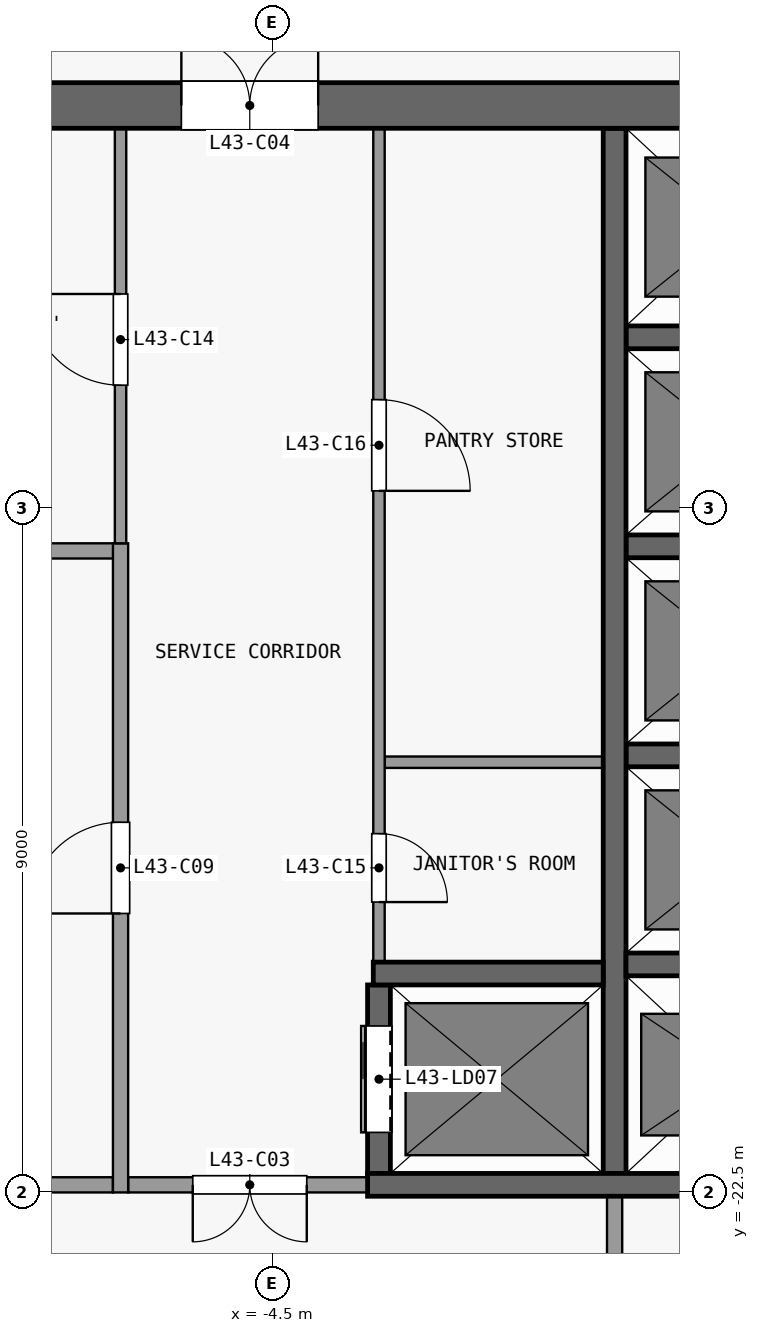
"""IFC4 building model, lengths in metres.
Left out: names, types, materials, properties, quantities, classifications, styles, units other than length and angle.
Written with IfcOpenShell. Run it as: python <this file> out.ifc"""

import sys

from ifc_helpers import new_model, si_unit, direction, frame, frame_2d, origin, place, context, subcontext, project, spatial, rectangle, extrude, element, fill, save


model = new_model("IFC4")
c1 = context("Model", 3, precision=1e-05, world=origin(), true_north=direction((0.0, 1.0)))
c2 = subcontext(c1, "Body", "Model", "MODEL_VIEW")
j1 = project(units=[si_unit("LENGTHUNIT", "METRE"), si_unit("PLANEANGLEUNIT", "RADIAN")], contexts=[c1])
p1 = place(None, origin())
s1 = spatial("IfcSite", under=j1, at=p1, CompositionType="ELEMENT")
p2 = place(p1, origin())
s2 = spatial("IfcBuilding", under=s1, at=p2, CompositionType="ELEMENT")
p3 = place(p2, frame((0.0, 0.0, 174.5)))
s3 = spatial("IfcBuildingStorey", under=s2, at=p3, CompositionType="ELEMENT", Elevation=174.5)
p4 = place(p3, frame((-13.3, -8.2, 0.0), z_axis=(0.0, 0.0, 1.0), x_axis=(1.0, 0.0, 0.0)))
e1 = element("IfcWall", 1, at=p4, inside=s3, PredefinedType="SHEAR", context=c2, shape_type="SweptSolid", body=[
    extrude(rectangle(XDim=26.6, YDim=0.6, at=frame_2d((13.3, 0.0))), origin(), (0.0, 0.0, 1.0), 3.3),
])
p5 = place(p4, frame((7.6, 0.0, 0.0)))
e2 = element("IfcOpeningElement", 2, at=p5, cuts=e1, PredefinedType="OPENING", context=c2, shape_type="SweptSolid", body=[
    extrude(rectangle(XDim=1.8, YDim=2.1, at=frame_2d((0.9, 1.05))), frame((0.0, 0.31, 0.0), z_axis=(0.0, -1.0, 0.0), x_axis=(1.0, 0.0, 0.0)), (0.0, 0.0, 1.0), 0.62),
])
p6 = place(p4, frame((17.2, 0.0, 0.0)))
e3 = element("IfcOpeningElement", 3, at=p6, cuts=e1, PredefinedType="OPENING", context=c2, shape_type="SweptSolid", body=[
    extrude(rectangle(XDim=1.8, YDim=2.1, at=frame_2d((0.9, 1.05))), frame((0.0, 0.31, 0.0), z_axis=(0.0, -1.0, 0.0), x_axis=(1.0, 0.0, 0.0)), (0.0, 0.0, 1.0), 0.62),
])
p7 = place(p4, frame((2.525, 0.0, 0.0)))
e4 = element("IfcOpeningElement", 4, at=p7, cuts=e1, PredefinedType="OPENING", context=c2, shape_type="SweptSolid", body=[
    extrude(rectangle(XDim=0.9, YDim=2.1, at=frame_2d((0.45, 1.05))), frame((0.0, 0.31, 0.0), z_axis=(0.0, -1.0, 0.0), x_axis=(1.0, 0.0, 0.0)), (0.0, 0.0, 1.0), 0.62),
])
p8 = place(p4, frame((23.175, 0.0, 0.0)))
e5 = element("IfcOpeningElement", 5, at=p8, cuts=e1, PredefinedType="OPENING", context=c2, shape_type="SweptSolid", body=[
    extrude(rectangle(XDim=0.9, YDim=2.1, at=frame_2d((0.45, 1.05))), frame((0.0, 0.31, 0.0), z_axis=(0.0, -1.0, 0.0), x_axis=(1.0, 0.0, 0.0)), (0.0, 0.0, 1.0), 0.62),
])
p9 = place(p3, frame((-9.45, -22.4, 0.0), z_axis=(0.0, 0.0, 1.0), x_axis=(1.0, 0.0, 0.0)))
e6 = element("IfcWall", 6, at=p9, inside=s3, PredefinedType="PARTITIONING", context=c2, shape_type="SweptSolid", body=[
    extrude(rectangle(XDim=2.85, YDim=0.2, at=frame_2d((1.425, 0.0))), origin(), (0.0, 0.0, 1.0), 3.3),
])
p10 = place(p3, frame((-3.25, -22.4, 0.0), z_axis=(0.0, 0.0, 1.0), x_axis=(-1.0, 0.0, 0.0)))
e7 = element("IfcWall", 7, at=p10, inside=s3, PredefinedType="PARTITIONING", context=c2, shape_type="SweptSolid", body=[
    extrude(rectangle(XDim=3.15, YDim=0.2, at=frame_2d((1.575, 0.0))), origin(), (0.0, 0.0, 1.0), 3.3),
])
p11 = place(p10, frame((0.8, 0.0, 0.0)))
e8 = element("IfcOpeningElement", 8, at=p11, cuts=e7, PredefinedType="OPENING", context=c2, shape_type="SweptSolid", body=[
    extrude(rectangle(XDim=1.5, YDim=2.1, at=frame_2d((0.75, 1.05))), frame((0.0, 0.11, 0.0), z_axis=(0.0, -1.0, 0.0), x_axis=(1.0, 0.0, 0.0)), (0.0, 0.0, 1.0), 0.22),
])
p12 = place(p3, frame((-3.25, -22.4, 0.0), z_axis=(0.0, 0.0, 1.0), x_axis=(1.0, 0.0, 0.0)))
e9 = element("IfcWall", 9, at=p12, inside=s3, PredefinedType="SHEAR", context=c2, shape_type="SweptSolid", body=[
    extrude(rectangle(XDim=6.2, YDim=0.3, at=frame_2d((3.1, 0.0))), origin(), (0.0, 0.0, 1.0), 3.3),
])
p13 = place(p3, frame((-3.175, -19.62, 0.0), z_axis=(0.0, 0.0, 1.0), x_axis=(1.0, 0.0, 0.0)))
e10 = element("IfcWall", 10, at=p13, inside=s3, PredefinedType="SHEAR", context=c2, shape_type="SweptSolid", body=[
    extrude(rectangle(XDim=3.025, YDim=0.3, at=frame_2d((1.513, 0.0))), origin(), (0.0, 0.0, 1.0), 3.3),
])
p14 = place(p3, frame((0.15, -19.5, 0.0), z_axis=(0.0, 0.0, 1.0), x_axis=(1.0, 0.0, 0.0)))
e11 = element("IfcWall", 11, at=p14, inside=s3, PredefinedType="SHEAR", context=c2, shape_type="SweptSolid", body=[
    extrude(rectangle(XDim=2.8, YDim=0.3, at=frame_2d((1.4, 0.0))), origin(), (0.0, 0.0, 1.0), 3.3),
])
p15 = place(p3, frame((-3.025, -16.84, 0.0), z_axis=(0.0, 0.0, 1.0), x_axis=(1.0, 0.0, 0.0)))
e12 = element("IfcWall", 12, at=p15, inside=s3, PredefinedType="PARTITIONING", context=c2, shape_type="SweptSolid", body=[
    extrude(rectangle(XDim=2.875, YDim=0.15, at=frame_2d((1.438, 0.0))), origin(), (0.0, 0.0, 1.0), 3.3),
])
p16 = place(p3, frame((0.15, -16.75, 0.0), z_axis=(0.0, 0.0, 1.0), x_axis=(1.0, 0.0, 0.0)))
e13 = element("IfcWall", 13, at=p16, inside=s3, PredefinedType="SHEAR", context=c2, shape_type="SweptSolid", body=[
    extrude(rectangle(XDim=2.8, YDim=0.3, at=frame_2d((1.4, 0.0))), origin(), (0.0, 0.0, 1.0), 3.3),
])
p17 = place(p3, frame((-9.5, -14.06, 0.0), z_axis=(0.0, 0.0, 1.0), x_axis=(1.0, 0.0, 0.0)))
e14 = element("IfcWall", 14, at=p17, inside=s3, PredefinedType="PARTITIONING", context=c2, shape_type="SweptSolid", body=[
    extrude(rectangle(XDim=3.075, YDim=0.2, at=frame_2d((1.538, 0.0))), origin(), (0.0, 0.0, 1.0), 3.3),
])
for number, where, z_axis, x_axis in (
    (15, (0.15, -14.0, 0.0), (0.0, 0.0, 1.0), (1.0, 0.0, 0.0)),
    (16, (0.15, -11.25, 0.0), (0.0, 0.0, 1.0), (1.0, 0.0, 0.0)),
):
    element("IfcWall", number, at=place(p3, frame(where, z_axis=z_axis, x_axis=x_axis)), inside=s3, PredefinedType="SHEAR", context=c2, shape_type="SweptSolid", body=[
        extrude(rectangle(XDim=2.8, YDim=0.3, at=frame_2d((1.4, 0.0))), origin(), (0.0, 0.0, 1.0), 3.3),
    ])
p18 = place(p3, frame((-6.5, -22.5, 0.0), z_axis=(0.0, 0.0, 1.0), x_axis=(0.0, 1.0, 0.0)))
e17 = element("IfcWall", 17, at=p18, inside=s3, PredefinedType="PARTITIONING", context=c2, shape_type="SweptSolid", body=[
    extrude(rectangle(XDim=8.54, YDim=0.2, at=frame_2d((4.27, 0.0))), origin(), (0.0, 0.0, 1.0), 3.3),
])
p19 = place(p18, frame((3.67, 0.0, 0.0)))
e18 = element("IfcOpeningElement", 18, at=p19, cuts=e17, PredefinedType="OPENING", context=c2, shape_type="SweptSolid", body=[
    extrude(rectangle(XDim=1.2, YDim=2.1, at=frame_2d((0.6, 1.05))), frame((0.0, 0.11, 0.0), z_axis=(0.0, -1.0, 0.0), x_axis=(1.0, 0.0, 0.0)), (0.0, 0.0, 1.0), 0.22),
])
p20 = place(p3, frame((-6.5, -13.96, 0.0), z_axis=(0.0, 0.0, 1.0), x_axis=(0.0, 1.0, 0.0)))
e19 = element("IfcWall", 19, at=p20, inside=s3, PredefinedType="PARTITIONING", context=c2, shape_type="SweptSolid", body=[
    extrude(rectangle(XDim=5.46, YDim=0.15, at=frame_2d((2.73, 0.0))), origin(), (0.0, 0.0, 1.0), 3.3),
])
p21 = place(p20, frame((2.08, 0.0, 0.0)))
e20 = element("IfcOpeningElement", 20, at=p21, cuts=e19, PredefinedType="OPENING", context=c2, shape_type="SweptSolid", body=[
    extrude(rectangle(XDim=1.2, YDim=2.1, at=frame_2d((0.6, 1.05))), frame((0.0, 0.085, 0.0), z_axis=(0.0, -1.0, 0.0), x_axis=(1.0, 0.0, 0.0)), (0.0, 0.0, 1.0), 0.17),
])
p22 = place(p3, frame((-3.1, -22.25, 0.0), z_axis=(0.0, 0.0, 1.0), x_axis=(0.0, 1.0, 0.0)))
e21 = element("IfcWall", 21, at=p22, inside=s3, PredefinedType="SHEAR", context=c2, shape_type="SweptSolid", body=[
    extrude(rectangle(XDim=2.48, YDim=0.3, at=frame_2d((1.24, 0.0))), origin(), (0.0, 0.0, 1.0), 3.3),
])
p23 = place(p22, frame((0.54, 0.0, 0.0)))
e22 = element("IfcOpeningElement", 22, at=p23, cuts=e21, PredefinedType="OPENING", context=c2, shape_type="SweptSolid", body=[
    extrude(rectangle(XDim=1.4, YDim=2.1, at=frame_2d((0.7, 1.05))), frame((0.0, 0.16, 0.0), z_axis=(0.0, -1.0, 0.0), x_axis=(1.0, 0.0, 0.0)), (0.0, 0.0, 1.0), 0.32),
])
p24 = place(p3, frame((-3.1, -8.5, 0.0), z_axis=(0.0, 0.0, 1.0), x_axis=(0.0, -1.0, 0.0)))
e23 = element("IfcWall", 23, at=p24, inside=s3, PredefinedType="PARTITIONING", context=c2, shape_type="SweptSolid", body=[
    extrude(rectangle(XDim=10.97, YDim=0.15, at=frame_2d((5.485, 0.0))), origin(), (0.0, 0.0, 1.0), 3.3),
])
p25 = place(p24, frame((9.28, 0.0, 0.0)))
e24 = element("IfcOpeningElement", 24, at=p25, cuts=e23, PredefinedType="OPENING", context=c2, shape_type="SweptSolid", body=[
    extrude(rectangle(XDim=0.9, YDim=2.1, at=frame_2d((0.45, 1.05))), frame((0.0, 0.085, 0.0), z_axis=(0.0, -1.0, 0.0), x_axis=(1.0, 0.0, 0.0)), (0.0, 0.0, 1.0), 0.17),
])
p26 = place(p24, frame((3.57, 0.0, 0.0)))
e25 = element("IfcOpeningElement", 25, at=p26, cuts=e23, PredefinedType="OPENING", context=c2, shape_type="SweptSolid", body=[
    extrude(rectangle(XDim=1.2, YDim=2.1, at=frame_2d((0.6, 1.05))), frame((0.0, 0.085, 0.0), z_axis=(0.0, -1.0, 0.0), x_axis=(1.0, 0.0, 0.0)), (0.0, 0.0, 1.0), 0.17),
])
p27 = place(p3, frame((0.0, -24.6, 0.0), z_axis=(0.0, 0.0, 1.0), x_axis=(0.0, 1.0, 0.0)))
e26 = element("IfcWall", 26, at=p27, inside=s3, PredefinedType="PARTITIONING", context=c2, shape_type="SweptSolid", body=[
    extrude(rectangle(XDim=2.05, YDim=0.2, at=frame_2d((1.025, 0.0))), origin(), (0.0, 0.0, 1.0), 3.3),
])
p28 = place(p3, frame((0.0, -22.25, 0.0), z_axis=(0.0, 0.0, 1.0), x_axis=(0.0, 1.0, 0.0)))
e27 = element("IfcWall", 27, at=p28, inside=s3, PredefinedType="SHEAR", context=c2, shape_type="SweptSolid", body=[
    extrude(rectangle(XDim=13.75, YDim=0.3, at=frame_2d((6.875, 0.0))), origin(), (0.0, 0.0, 1.0), 3.3),
])
p29 = place(p23, origin())
e28 = element("IfcDoor", 28, at=p29, inside=s3, OperationType="DOUBLE_DOOR_SLIDING", PredefinedType="DOOR", context=c2, shape_type="SweptSolid", body=[
    extrude(rectangle(XDim=1.4, YDim=2.1, at=frame_2d((0.7, 1.05))), frame((0.0, 0.025, 0.0), z_axis=(0.0, -1.0, 0.0), x_axis=(1.0, 0.0, 0.0)), (0.0, 0.0, 1.0), 0.05),
])
fill(e22, e28)
p30 = place(p11, origin())
e29 = element("IfcDoor", 29, at=p30, inside=s3, OperationType="DOUBLE_DOOR_SINGLE_SWING", PredefinedType="DOOR", context=c2, shape_type="SweptSolid", body=[
    extrude(rectangle(XDim=1.5, YDim=2.1, at=frame_2d((0.75, 1.05))), frame((0.0, 0.025, 0.0), z_axis=(0.0, -1.0, 0.0), x_axis=(1.0, 0.0, 0.0)), (0.0, 0.0, 1.0), 0.05),
])
fill(e8, e29)
p31 = place(p5, origin())
e30 = element("IfcDoor", 30, at=p31, inside=s3, OperationType="DOUBLE_DOOR_SINGLE_SWING", PredefinedType="DOOR", context=c2, shape_type="SweptSolid", body=[
    extrude(rectangle(XDim=1.8, YDim=2.1, at=frame_2d((0.9, 1.05))), frame((0.0, 0.025, 0.0), z_axis=(0.0, -1.0, 0.0), x_axis=(1.0, 0.0, 0.0)), (0.0, 0.0, 1.0), 0.05),
])
fill(e2, e30)
p32 = place(p19, origin())
e31 = element("IfcDoor", 31, at=p32, inside=s3, OperationType="SINGLE_SWING_LEFT", PredefinedType="DOOR", context=c2, shape_type="SweptSolid", body=[
    extrude(rectangle(XDim=1.2, YDim=2.1, at=frame_2d((0.6, 1.05))), frame((0.0, 0.025, 0.0), z_axis=(0.0, -1.0, 0.0), x_axis=(1.0, 0.0, 0.0)), (0.0, 0.0, 1.0), 0.05),
])
fill(e18, e31)
p33 = place(p21, origin())
e32 = element("IfcDoor", 32, at=p33, inside=s3, OperationType="SINGLE_SWING_RIGHT", PredefinedType="DOOR", context=c2, shape_type="SweptSolid", body=[
    extrude(rectangle(XDim=1.2, YDim=2.1, at=frame_2d((0.6, 1.05))), frame((0.0, 0.025, 0.0), z_axis=(0.0, -1.0, 0.0), x_axis=(1.0, 0.0, 0.0)), (0.0, 0.0, 1.0), 0.05),
])
fill(e20, e32)
p34 = place(p25, origin())
e33 = element("IfcDoor", 33, at=p34, inside=s3, OperationType="SINGLE_SWING_RIGHT", PredefinedType="DOOR", context=c2, shape_type="SweptSolid", body=[
    extrude(rectangle(XDim=0.9, YDim=2.1, at=frame_2d((0.45, 1.05))), frame((0.0, 0.025, 0.0), z_axis=(0.0, -1.0, 0.0), x_axis=(1.0, 0.0, 0.0)), (0.0, 0.0, 1.0), 0.05),
])
fill(e24, e33)
p35 = place(p26, origin())
e34 = element("IfcDoor", 34, at=p35, inside=s3, OperationType="SINGLE_SWING_RIGHT", PredefinedType="DOOR", context=c2, shape_type="SweptSolid", body=[
    extrude(rectangle(XDim=1.2, YDim=2.1, at=frame_2d((0.6, 1.05))), frame((0.0, 0.025, 0.0), z_axis=(0.0, -1.0, 0.0), x_axis=(1.0, 0.0, 0.0)), (0.0, 0.0, 1.0), 0.05),
])
fill(e25, e34)
save(model, sys.argv[1])
